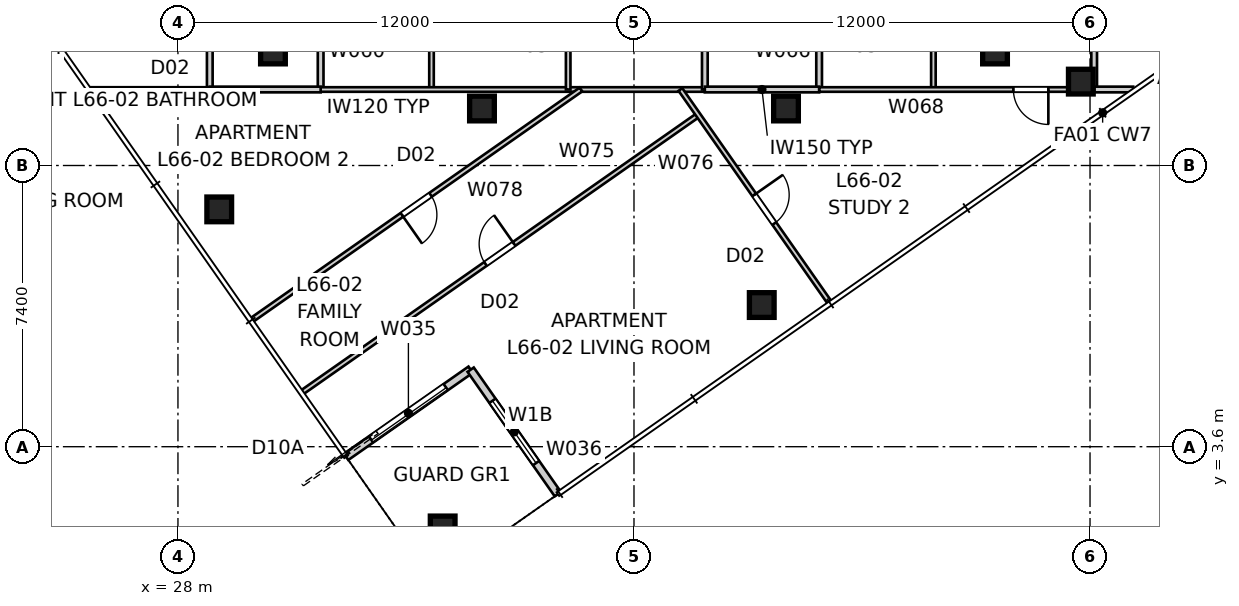
"""IFC4 building model, lengths in metres.
Left out: names, types, materials, properties, quantities, classifications, styles, units other than length and angle.
Written with IfcOpenShell. Run it as: python <this file> out.ifc"""

import sys

from ifc_helpers import new_model, si_unit, direction, frame, frame_2d, origin, origin_2d, place, context, subcontext, project, spatial, rectangle, extrude, element, fill, save


model = new_model("IFC4")
c1 = context("Model", 3, precision=1e-05, world=origin(), true_north=direction((0.0, 1.0)))
c2 = subcontext(c1, "Body", "Model", "MODEL_VIEW")
j1 = project(units=[si_unit("LENGTHUNIT", "METRE"), si_unit("PLANEANGLEUNIT", "RADIAN")], contexts=[c1])
p1 = place(None, origin())
s1 = spatial("IfcSite", under=j1, at=p1, CompositionType="ELEMENT")
p2 = place(p1, origin())
s2 = spatial("IfcBuilding", under=s1, at=p2, CompositionType="ELEMENT")
p3 = place(p2, frame((0.0, 0.0, 240.4)))
s3 = spatial("IfcBuildingStorey", under=s2, at=p3, CompositionType="ELEMENT", Elevation=240.4)
for number, where, z_axis, x_axis in (
    (1, (34.966, 1.449, -0.15), (0.0, 0.0, 1.0), (1.0, 0.0, 0.0)),
    (2, (43.362, 7.328, -0.15), (0.0, 0.0, 1.0), (1.0, 0.0, 0.0)),
    (3, (51.758, 13.207, -0.15), (0.0, 0.0, 1.0), (1.0, 0.0, 0.0)),
    (4, (29.086, 9.845, -0.15), (0.0, 0.0, 1.0), (1.0, 0.0, 0.0)),
):
    element("IfcColumn", number, at=place(p3, frame(where, z_axis=z_axis, x_axis=x_axis)), inside=s3, PredefinedType="COLUMN", context=c2, shape_type="SweptSolid", body=[
        extrude(rectangle(XDim=0.65, YDim=0.65, at=origin_2d()), origin(), (0.0, 0.0, 1.0), 3.55),
    ])
for number, where, z_axis, x_axis in (
    (5, (30.5, 14.0, 0.0), (0.0, 0.0, 1.0), (1.0, 0.0, 0.0)),
    (6, (36.0, 12.5, 0.0), (0.0, 0.0, 1.0), (1.0, 0.0, 0.0)),
    (7, (44.0, 12.5, 0.0), (0.0, 0.0, 1.0), (1.0, 0.0, 0.0)),
    (8, (49.5, 14.0, 0.0), (0.0, 0.0, 1.0), (1.0, 0.0, 0.0)),
):
    element("IfcColumn", number, at=place(p3, frame(where, z_axis=z_axis, x_axis=x_axis)), inside=s3, PredefinedType="COLUMN", context=c2, shape_type="SweptSolid", body=[
        extrude(rectangle(XDim=0.65, YDim=0.65, at=origin_2d()), origin(), (0.0, 0.0, 1.0), 3.4),
    ])
p4 = place(p3, frame((32.426, 3.333, 0.0), z_axis=(0.0, 0.0, 1.0), x_axis=(0.819165963305, 0.573556557423, 0.0)))
e9 = element("IfcWall", 9, at=p4, inside=s3, PredefinedType="SOLIDWALL", context=c2, shape_type="SweptSolid", body=[
    extrude(rectangle(XDim=4.0, YDim=0.2, at=frame_2d((2.0, 0.0))), origin(), (0.0, 0.0, 1.0), 3.25),
])
p5 = place(p4, frame((0.8, 0.0, 0.0)))
e10 = element("IfcOpeningElement", 10, at=p5, cuts=e9, PredefinedType="OPENING", context=c2, shape_type="SweptSolid", body=[
    extrude(rectangle(XDim=2.4, YDim=2.1, at=frame_2d((1.2, 1.05))), frame((0.0, 0.11, 0.0), z_axis=(0.0, -1.0, 0.0), x_axis=(1.0, 0.0, 0.0)), (0.0, 0.0, 1.0), 0.22),
])
p6 = place(p3, frame((35.702, 5.627, 0.0), z_axis=(0.0, 0.0, 1.0), x_axis=(0.573597512525, -0.819137286189, 0.0)))
e11 = element("IfcWall", 11, at=p6, inside=s3, PredefinedType="SOLIDWALL", context=c2, shape_type="SweptSolid", body=[
    extrude(rectangle(XDim=4.0, YDim=0.2, at=frame_2d((2.0, 0.0))), origin(), (0.0, 0.0, 1.0), 3.25),
])
p7 = place(p6, frame((1.0, 0.0, 0.45)))
e12 = element("IfcOpeningElement", 12, at=p7, cuts=e11, PredefinedType="OPENING", context=c2, shape_type="SweptSolid", body=[
    extrude(rectangle(XDim=2.0, YDim=1.8, at=frame_2d((1.0, 0.9))), frame((0.0, 0.11, 0.0), z_axis=(0.0, -1.0, 0.0), x_axis=(1.0, 0.0, 0.0)), (0.0, 0.0, 1.0), 0.22),
])
p8 = place(p3, frame((28.837, 17.9, 0.0), z_axis=(0.0, 0.0, 1.0), x_axis=(0.0, -1.0, 0.0)))
e13 = element("IfcWall", 13, at=p8, inside=s3, PredefinedType="SOLIDWALL", context=c2, shape_type="SweptSolid", body=[
    extrude(rectangle(XDim=4.9, YDim=0.15, at=frame_2d((2.45, 0.0))), origin(), (0.0, 0.0, 1.0), 3.25),
])
p9 = place(p8, frame((2.603, 0.0, 0.0)))
e14 = element("IfcOpeningElement", 14, at=p9, cuts=e13, PredefinedType="OPENING", context=c2, shape_type="SweptSolid", body=[
    extrude(rectangle(XDim=0.92, YDim=2.34, at=frame_2d((0.46, 1.17))), frame((0.0, 0.085, 0.0), z_axis=(0.0, -1.0, 0.0), x_axis=(1.0, 0.0, 0.0)), (0.0, 0.0, 1.0), 0.17),
])
p10 = place(p3, frame((28.837, 13.0, 0.0), z_axis=(0.0, 0.0, 1.0), x_axis=(-1.0, 0.0, 0.0)))
e15 = element("IfcWall", 15, at=p10, inside=s3, PredefinedType="PARTITIONING", context=c2, shape_type="SweptSolid", body=[
    extrude(rectangle(XDim=3.132, YDim=0.12, at=frame_2d((1.566, 0.0))), origin(), (0.0, 0.0, 1.0), 3.25),
])
p11 = place(p3, frame((31.755, 13.0, 0.0), z_axis=(0.0, 0.0, 1.0), x_axis=(0.0, 1.0, 0.0)))
e16 = element("IfcWall", 16, at=p11, inside=s3, PredefinedType="SOLIDWALL", context=c2, shape_type="SweptSolid", body=[
    extrude(rectangle(XDim=4.9, YDim=0.15, at=frame_2d((2.45, 0.0))), origin(), (0.0, 0.0, 1.0), 3.25),
])
p12 = place(p11, frame((1.97, 0.0, 0.0)))
e17 = element("IfcOpeningElement", 17, at=p12, cuts=e16, PredefinedType="OPENING", context=c2, shape_type="SweptSolid", body=[
    extrude(rectangle(XDim=0.96, YDim=2.1, at=frame_2d((0.48, 1.05))), frame((0.0, 0.085, 0.0), z_axis=(0.0, -1.0, 0.0), x_axis=(1.0, 0.0, 0.0)), (0.0, 0.0, 1.0), 0.17),
])
p13 = place(p3, frame((34.672, 17.9, 0.0), z_axis=(0.0, 0.0, 1.0), x_axis=(0.0, -1.0, 0.0)))
e18 = element("IfcWall", 18, at=p13, inside=s3, PredefinedType="PARTITIONING", context=c2, shape_type="SweptSolid", body=[
    extrude(rectangle(XDim=4.9, YDim=0.12, at=frame_2d((2.45, 0.0))), origin(), (0.0, 0.0, 1.0), 3.25),
])
p14 = place(p13, frame((1.97, 0.0, 0.0)))
e19 = element("IfcOpeningElement", 19, at=p14, cuts=e18, PredefinedType="OPENING", context=c2, shape_type="SweptSolid", body=[
    extrude(rectangle(XDim=0.96, YDim=2.1, at=frame_2d((0.48, 1.05))), frame((0.0, 0.07, 0.0), z_axis=(0.0, -1.0, 0.0), x_axis=(1.0, 0.0, 0.0)), (0.0, 0.0, 1.0), 0.14),
])
p15 = place(p3, frame((41.865, 13.0, 0.0), z_axis=(0.0, 0.0, 1.0), x_axis=(-1.0, 0.0, 0.0)))
e20 = element("IfcWall", 20, at=p15, inside=s3, PredefinedType="PARTITIONING", context=c2, shape_type="SweptSolid", body=[
    extrude(rectangle(XDim=10.11, YDim=0.12, at=frame_2d((5.055, 0.0))), origin(), (0.0, 0.0, 1.0), 2.55),
])
p16 = place(p3, frame((31.755, 13.0, 0.0), z_axis=(0.0, 0.0, 1.0), x_axis=(-1.0, 0.0, 0.0)))
e21 = element("IfcWall", 21, at=p16, inside=s3, PredefinedType="SOLIDWALL", context=c2, shape_type="SweptSolid", body=[
    extrude(rectangle(XDim=2.917, YDim=0.15, at=frame_2d((1.458, 0.0))), origin(), (0.0, 0.0, 1.0), 3.25),
])
p17 = place(p3, frame((38.268, 13.0, 0.0), z_axis=(0.0, 0.0, 1.0), x_axis=(0.0, 1.0, 0.0)))
e22 = element("IfcWall", 22, at=p17, inside=s3, PredefinedType="PARTITIONING", context=c2, shape_type="SweptSolid", body=[
    extrude(rectangle(XDim=4.9, YDim=0.12, at=frame_2d((2.45, 0.0))), origin(), (0.0, 0.0, 1.0), 3.25),
])
p18 = place(p17, frame((1.97, 0.0, 0.0)))
e23 = element("IfcOpeningElement", 23, at=p18, cuts=e22, PredefinedType="OPENING", context=c2, shape_type="SweptSolid", body=[
    extrude(rectangle(XDim=0.96, YDim=2.1, at=frame_2d((0.48, 1.05))), frame((0.0, 0.07, 0.0), z_axis=(0.0, -1.0, 0.0), x_axis=(1.0, 0.0, 0.0)), (0.0, 0.0, 1.0), 0.14),
])
p19 = place(p3, frame((41.865, 17.9, 0.0), z_axis=(0.0, 0.0, 1.0), x_axis=(0.0, -1.0, 0.0)))
e24 = element("IfcWall", 24, at=p19, inside=s3, PredefinedType="SOLIDWALL", context=c2, shape_type="SweptSolid", body=[
    extrude(rectangle(XDim=4.9, YDim=0.15, at=frame_2d((2.45, 0.0))), origin(), (0.0, 0.0, 1.0), 3.25),
])
p20 = place(p19, frame((1.97, 0.0, 0.0)))
e25 = element("IfcOpeningElement", 25, at=p20, cuts=e24, PredefinedType="OPENING", context=c2, shape_type="SweptSolid", body=[
    extrude(rectangle(XDim=0.96, YDim=2.1, at=frame_2d((0.48, 1.05))), frame((0.0, 0.085, 0.0), z_axis=(0.0, -1.0, 0.0), x_axis=(1.0, 0.0, 0.0)), (0.0, 0.0, 1.0), 0.17),
])
p21 = place(p3, frame((44.871, 13.0, 0.0), z_axis=(0.0, 0.0, 1.0), x_axis=(0.0, 1.0, 0.0)))
e26 = element("IfcWall", 26, at=p21, inside=s3, PredefinedType="SOLIDWALL", context=c2, shape_type="SweptSolid", body=[
    extrude(rectangle(XDim=4.9, YDim=0.15, at=frame_2d((2.45, 0.0))), origin(), (0.0, 0.0, 1.0), 3.25),
])
p22 = place(p21, frame((1.97, 0.0, 0.0)))
e27 = element("IfcOpeningElement", 27, at=p22, cuts=e26, PredefinedType="OPENING", context=c2, shape_type="SweptSolid", body=[
    extrude(rectangle(XDim=0.96, YDim=2.1, at=frame_2d((0.48, 1.05))), frame((0.0, 0.085, 0.0), z_axis=(0.0, -1.0, 0.0), x_axis=(1.0, 0.0, 0.0)), (0.0, 0.0, 1.0), 0.17),
])
p23 = place(p3, frame((47.878, 17.9, 0.0), z_axis=(0.0, 0.0, 1.0), x_axis=(0.0, -1.0, 0.0)))
e28 = element("IfcWall", 28, at=p23, inside=s3, PredefinedType="PARTITIONING", context=c2, shape_type="SweptSolid", body=[
    extrude(rectangle(XDim=4.9, YDim=0.12, at=frame_2d((2.45, 0.0))), origin(), (0.0, 0.0, 1.0), 3.25),
])
p24 = place(p23, frame((1.97, 0.0, 0.0)))
e29 = element("IfcOpeningElement", 29, at=p24, cuts=e28, PredefinedType="OPENING", context=c2, shape_type="SweptSolid", body=[
    extrude(rectangle(XDim=0.96, YDim=2.1, at=frame_2d((0.48, 1.05))), frame((0.0, 0.07, 0.0), z_axis=(0.0, -1.0, 0.0), x_axis=(1.0, 0.0, 0.0)), (0.0, 0.0, 1.0), 0.14),
])
p25 = place(p3, frame((52.109, 13.0, 0.0), z_axis=(0.0, 0.0, 1.0), x_axis=(-1.0, 0.0, 0.0)))
e30 = element("IfcWall", 30, at=p25, inside=s3, PredefinedType="PARTITIONING", context=c2, shape_type="SweptSolid", body=[
    extrude(rectangle(XDim=7.238, YDim=0.12, at=frame_2d((3.619, 0.0))), origin(), (0.0, 0.0, 1.0), 2.55),
])
p26 = place(p25, frame((1.205, 0.0, 0.0)))
e31 = element("IfcOpeningElement", 31, at=p26, cuts=e30, PredefinedType="OPENING", context=c2, shape_type="SweptSolid", body=[
    extrude(rectangle(XDim=0.92, YDim=2.34, at=frame_2d((0.46, 1.17))), frame((0.0, 0.07, 0.0), z_axis=(0.0, -1.0, 0.0), x_axis=(1.0, 0.0, 0.0)), (0.0, 0.0, 1.0), 0.14),
])
p27 = place(p3, frame((44.871, 13.0, 0.0), z_axis=(0.0, 0.0, 1.0), x_axis=(-1.0, 0.0, 0.0)))
e32 = element("IfcWall", 32, at=p27, inside=s3, PredefinedType="SOLIDWALL", context=c2, shape_type="SweptSolid", body=[
    extrude(rectangle(XDim=3.007, YDim=0.15, at=frame_2d((1.503, 0.0))), origin(), (0.0, 0.0, 1.0), 3.25),
])
p28 = place(p3, frame((52.109, 18.194, 0.0), z_axis=(0.0, 0.0, 1.0), x_axis=(0.0, -1.0, 0.0)))
e33 = element("IfcWall", 33, at=p28, inside=s3, PredefinedType="SOLIDWALL", context=c2, shape_type="SweptSolid", body=[
    extrude(rectangle(XDim=5.194, YDim=0.15, at=frame_2d((2.597, 0.0))), origin(), (0.0, 0.0, 1.0), 3.25),
])
p29 = place(p28, frame((2.337, 0.0, 0.0)))
e34 = element("IfcOpeningElement", 34, at=p29, cuts=e33, PredefinedType="OPENING", context=c2, shape_type="SweptSolid", body=[
    extrude(rectangle(XDim=0.92, YDim=2.34, at=frame_2d((0.46, 1.17))), frame((0.0, 0.085, 0.0), z_axis=(0.0, -1.0, 0.0), x_axis=(1.0, 0.0, 0.0)), (0.0, 0.0, 1.0), 0.17),
])
p30 = place(p3, frame((53.136, 13.0, 0.0), z_axis=(0.0, 0.0, 1.0), x_axis=(-1.0, 0.0, 0.0)))
e35 = element("IfcWall", 35, at=p30, inside=s3, PredefinedType="SOLIDWALL", context=c2, shape_type="SweptSolid", body=[
    extrude(rectangle(XDim=1.027, YDim=0.15, at=frame_2d((0.513, 0.0))), origin(), (0.0, 0.0, 1.0), 3.25),
])
p31 = place(p3, frame((31.279, 5.04, 0.0), z_axis=(0.0, 0.0, 1.0), x_axis=(0.819155207289, 0.573571919092, 0.0)))
e36 = element("IfcWall", 36, at=p31, inside=s3, PredefinedType="PARTITIONING", context=c2, shape_type="SweptSolid", body=[
    extrude(rectangle(XDim=12.71, YDim=0.12, at=frame_2d((6.355, 0.0))), origin(), (0.0, 0.0, 1.0), 2.717),
])
p32 = place(p31, frame((5.875, 0.0, 0.0)))
e37 = element("IfcOpeningElement", 37, at=p32, cuts=e36, PredefinedType="OPENING", context=c2, shape_type="SweptSolid", body=[
    extrude(rectangle(XDim=0.92, YDim=2.34, at=frame_2d((0.46, 1.17))), frame((0.0, 0.07, 0.0), z_axis=(0.0, -1.0, 0.0), x_axis=(1.0, 0.0, 0.0)), (0.0, 0.0, 1.0), 0.14),
])
p33 = place(p3, frame((41.222, 13.0, 0.0), z_axis=(0.0, 0.0, 1.0), x_axis=(0.57357503053, -0.819153028653, 0.0)))
e38 = element("IfcWall", 38, at=p33, inside=s3, PredefinedType="PARTITIONING", context=c2, shape_type="SweptSolid", body=[
    extrude(rectangle(XDim=6.834, YDim=0.12, at=frame_2d((3.417, 0.0))), origin(), (0.0, 0.0, 1.0), 3.25),
])
p34 = place(p33, frame((3.386, 0.0, 0.0)))
e39 = element("IfcOpeningElement", 39, at=p34, cuts=e38, PredefinedType="OPENING", context=c2, shape_type="SweptSolid", body=[
    extrude(rectangle(XDim=0.92, YDim=2.34, at=frame_2d((0.46, 1.17))), frame((0.0, 0.07, 0.0), z_axis=(0.0, -1.0, 0.0), x_axis=(1.0, 0.0, 0.0)), (0.0, 0.0, 1.0), 0.14),
])
p35 = place(p3, frame((38.604, 13.0, 0.0), z_axis=(0.0, 0.0, 1.0), x_axis=(-0.819123352089, -0.573617410878, 0.0)))
e40 = element("IfcWall", 40, at=p35, inside=s3, PredefinedType="PARTITIONING", context=c2, shape_type="SweptSolid", body=[
    extrude(rectangle(XDim=10.566, YDim=0.12, at=frame_2d((5.283, 0.0))), origin(), (0.0, 0.0, 1.0), 3.25),
])
p36 = place(p35, frame((4.831, 0.0, 0.0)))
e41 = element("IfcOpeningElement", 41, at=p36, cuts=e40, PredefinedType="OPENING", context=c2, shape_type="SweptSolid", body=[
    extrude(rectangle(XDim=0.92, YDim=2.34, at=frame_2d((0.46, 1.17))), frame((0.0, 0.07, 0.0), z_axis=(0.0, -1.0, 0.0), x_axis=(1.0, 0.0, 0.0)), (0.0, 0.0, 1.0), 0.14),
])
p37 = place(p5, origin())
e42 = element("IfcDoor", 42, at=p37, inside=s3, OperationType="SLIDING_TO_LEFT", PredefinedType="DOOR", context=c2, shape_type="SweptSolid", body=[
    extrude(rectangle(XDim=2.4, YDim=2.1, at=frame_2d((1.2, 1.05))), frame((0.0, 0.025, 0.0), z_axis=(0.0, -1.0, 0.0), x_axis=(1.0, 0.0, 0.0)), (0.0, 0.0, 1.0), 0.05),
])
fill(e10, e42)
p38 = place(p7, origin())
e43 = element("IfcWindow", 43, at=p38, inside=s3, PartitioningType="SINGLE_PANEL", PredefinedType="WINDOW", context=c2, shape_type="SweptSolid", body=[
    extrude(rectangle(XDim=2.0, YDim=1.8, at=frame_2d((1.0, 0.9))), frame((0.0, 0.03, 0.0), z_axis=(0.0, -1.0, 0.0), x_axis=(1.0, 0.0, 0.0)), (0.0, 0.0, 1.0), 0.06),
])
fill(e12, e43)
p39 = place(p26, origin())
e44 = element("IfcDoor", 44, at=p39, inside=s3, OperationType="SINGLE_SWING_LEFT", PredefinedType="DOOR", context=c2, shape_type="SweptSolid", body=[
    extrude(rectangle(XDim=0.92, YDim=2.34, at=frame_2d((0.46, 1.17))), frame((0.0, 0.025, 0.0), z_axis=(0.0, -1.0, 0.0), x_axis=(1.0, 0.0, 0.0)), (0.0, 0.0, 1.0), 0.05),
])
fill(e31, e44)
p40 = place(p34, origin())
e45 = element("IfcDoor", 45, at=p40, inside=s3, OperationType="SINGLE_SWING_LEFT", PredefinedType="DOOR", context=c2, shape_type="SweptSolid", body=[
    extrude(rectangle(XDim=0.92, YDim=2.34, at=frame_2d((0.46, 1.17))), frame((0.0, 0.025, 0.0), z_axis=(0.0, -1.0, 0.0), x_axis=(1.0, 0.0, 0.0)), (0.0, 0.0, 1.0), 0.05),
])
fill(e39, e45)
p41 = place(p32, origin())
e46 = element("IfcDoor", 46, at=p41, inside=s3, OperationType="SINGLE_SWING_RIGHT", PredefinedType="DOOR", context=c2, shape_type="SweptSolid", body=[
    extrude(rectangle(XDim=0.92, YDim=2.34, at=frame_2d((0.46, 1.17))), frame((0.0, 0.025, 0.0), z_axis=(0.0, -1.0, 0.0), x_axis=(1.0, 0.0, 0.0)), (0.0, 0.0, 1.0), 0.05),
])
fill(e37, e46)
p42 = place(p36, origin())
e47 = element("IfcDoor", 47, at=p42, inside=s3, OperationType="SINGLE_SWING_RIGHT", PredefinedType="DOOR", context=c2, shape_type="SweptSolid", body=[
    extrude(rectangle(XDim=0.92, YDim=2.34, at=frame_2d((0.46, 1.17))), frame((0.0, 0.025, 0.0), z_axis=(0.0, -1.0, 0.0), x_axis=(1.0, 0.0, 0.0)), (0.0, 0.0, 1.0), 0.05),
])
fill(e41, e47)
save(model, sys.argv[1])
